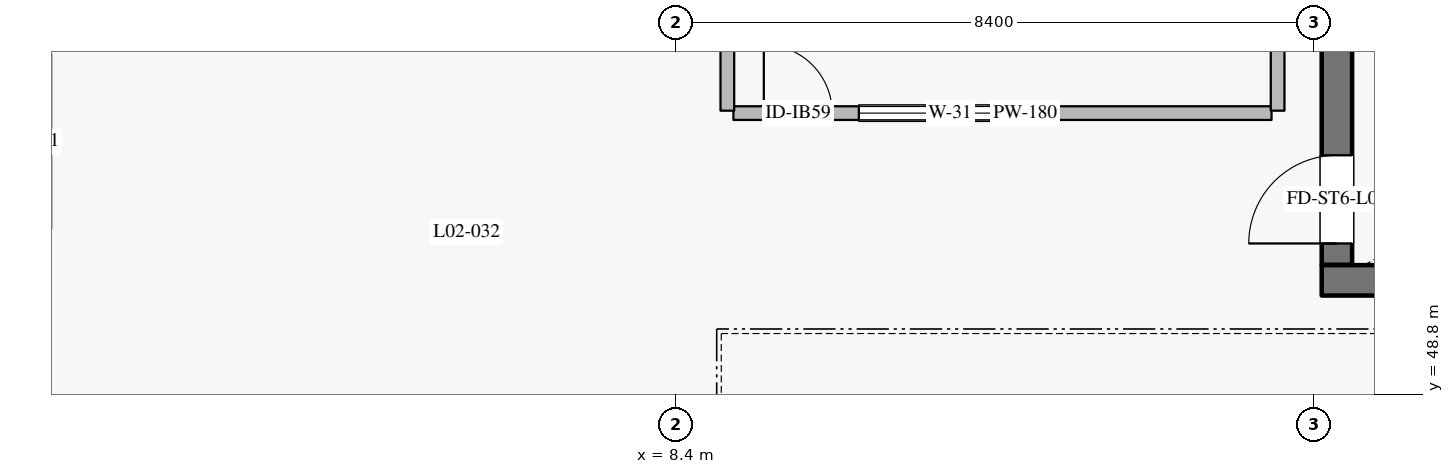
"""IFC4 building model, lengths in metres.
Left out: names, types, materials, properties, quantities, classifications, styles, units other than length and angle.
Written with IfcOpenShell. Run it as: python <this file> out.ifc"""

import sys

from ifc_helpers import new_model, si_unit, direction, frame, frame_2d, origin, place, context, subcontext, project, spatial, rectangle, extrude, element, fill, save


model = new_model("IFC4")
c1 = context("Model", 3, precision=1e-05, world=origin(), true_north=direction((0.0, 1.0)))
c2 = subcontext(c1, "Body", "Model", "MODEL_VIEW")
j1 = project(units=[si_unit("LENGTHUNIT", "METRE"), si_unit("PLANEANGLEUNIT", "RADIAN")], contexts=[c1])
p1 = place(None, origin())
s1 = spatial("IfcSite", under=j1, at=p1, CompositionType="ELEMENT")
p2 = place(p1, origin())
s2 = spatial("IfcBuilding", under=s1, at=p2, CompositionType="ELEMENT")
p3 = place(p2, frame((0.0, 0.0, 11.4)))
s3 = spatial("IfcBuildingStorey", under=s2, at=p3, CompositionType="ELEMENT", Elevation=11.4)
p4 = place(p3, frame((16.9, 50.3, 0.0), z_axis=(0.0, 0.0, 1.0), x_axis=(1.0, 0.0, 0.0)))
e1 = element("IfcWall", 1, at=p4, inside=s3, PredefinedType="SHEAR", context=c2, shape_type="SweptSolid", body=[
    extrude(rectangle(XDim=8.2, YDim=0.4, at=frame_2d((4.1, 0.0))), origin(), (0.0, 0.0, 1.0), 4.535),
])
p5 = place(p3, frame((17.1, 50.505, 0.0), z_axis=(0.0, 0.0, 1.0), x_axis=(0.0, 1.0, 0.0)))
e2 = element("IfcWall", 2, at=p5, inside=s3, PredefinedType="SHEAR", context=c2, shape_type="SweptSolid", body=[
    extrude(rectangle(XDim=3.95, YDim=0.4, at=frame_2d((1.975, 0.0))), origin(), (0.0, 0.0, 1.0), 4.535),
])
p6 = place(p5, frame((0.28, 0.0, 0.0)))
e3 = element("IfcOpeningElement", 3, at=p6, cuts=e2, PredefinedType="OPENING", context=c2, shape_type="SweptSolid", body=[
    extrude(rectangle(XDim=1.16, YDim=2.2, at=frame_2d((0.58, 1.1))), frame((0.0, 0.21, 0.0), z_axis=(0.0, -1.0, 0.0), x_axis=(1.0, 0.0, 0.0)), (0.0, 0.0, 1.0), 0.42),
])
p7 = place(p3, frame((9.16, 52.5, 0.0), z_axis=(0.0, 0.0, 1.0), x_axis=(1.0, 0.0, 0.0)))
e4 = element("IfcWall", 4, at=p7, inside=s3, PredefinedType="PARTITIONING", context=c2, shape_type="SweptSolid", body=[
    extrude(rectangle(XDim=7.08, YDim=0.18, at=frame_2d((3.54, 0.0))), origin(), (0.0, 0.0, 1.0), 4.535),
])
p8 = place(p7, frame((0.4, 0.0, 0.0)))
e5 = element("IfcOpeningElement", 5, at=p8, cuts=e4, PredefinedType="OPENING", context=c2, shape_type="SweptSolid", body=[
    extrude(rectangle(XDim=0.9, YDim=2.1, at=frame_2d((0.45, 1.05))), frame((0.0, 0.1, 0.0), z_axis=(0.0, -1.0, 0.0), x_axis=(1.0, 0.0, 0.0)), (0.0, 0.0, 1.0), 0.2),
])
p9 = place(p7, frame((1.65, 0.0, 0.9)))
e6 = element("IfcOpeningElement", 6, at=p9, cuts=e4, PredefinedType="OPENING", context=c2, shape_type="SweptSolid", body=[
    extrude(rectangle(XDim=2.4, YDim=1.3, at=frame_2d((1.2, 0.65))), frame((0.0, 0.1, 0.0), z_axis=(0.0, -1.0, 0.0), x_axis=(1.0, 0.0, 0.0)), (0.0, 0.0, 1.0), 0.2),
])
for number, where, z_axis, x_axis in (
    (7, (9.08, 52.532, 0.0), (0.0, 0.0, 1.0), (0.0, 1.0, 0.0)),
    (8, (16.32, 52.532, 0.0), (0.0, 0.0, 1.0), (0.0, 1.0, 0.0)),
):
    element("IfcWall", number, at=place(p3, frame(where, z_axis=z_axis, x_axis=x_axis)), inside=s3, PredefinedType="PARTITIONING", context=c2, shape_type="SweptSolid", body=[
        extrude(rectangle(XDim=2.768, YDim=0.18, at=frame_2d((1.384, 0.0))), origin(), (0.0, 0.0, 1.0), 4.535),
    ])
p10 = place(p6, origin())
e9 = element("IfcDoor", 9, at=p10, inside=s3, OperationType="SINGLE_SWING_LEFT", PredefinedType="DOOR", context=c2, shape_type="SweptSolid", body=[
    extrude(rectangle(XDim=1.16, YDim=2.2, at=frame_2d((0.58, 1.1))), frame((0.0, 0.025, 0.0), z_axis=(0.0, -1.0, 0.0), x_axis=(1.0, 0.0, 0.0)), (0.0, 0.0, 1.0), 0.05),
])
fill(e3, e9)
p11 = place(p8, origin())
e10 = element("IfcDoor", 10, at=p11, inside=s3, OperationType="SINGLE_SWING_LEFT", PredefinedType="DOOR", context=c2, shape_type="SweptSolid", body=[
    extrude(rectangle(XDim=0.9, YDim=2.1, at=frame_2d((0.45, 1.05))), frame((0.0, 0.025, 0.0), z_axis=(0.0, -1.0, 0.0), x_axis=(1.0, 0.0, 0.0)), (0.0, 0.0, 1.0), 0.05),
])
fill(e5, e10)
p12 = place(p9, origin())
e11 = element("IfcWindow", 11, at=p12, inside=s3, PartitioningType="DOUBLE_PANEL_VERTICAL", PredefinedType="WINDOW", context=c2, shape_type="SweptSolid", body=[
    extrude(rectangle(XDim=2.4, YDim=1.3, at=frame_2d((1.2, 0.65))), frame((0.0, 0.03, 0.0), z_axis=(0.0, -1.0, 0.0), x_axis=(1.0, 0.0, 0.0)), (0.0, 0.0, 1.0), 0.06),
])
fill(e6, e11)
save(model, sys.argv[1])
